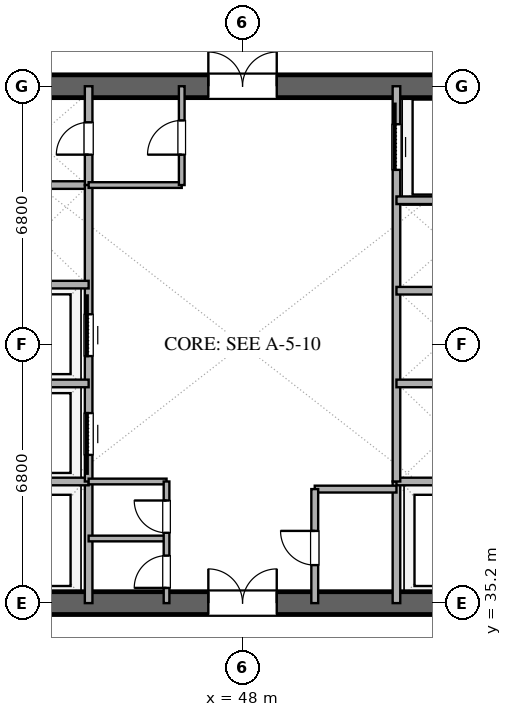
"""IFC4 building model, lengths in metres.
Left out: names, types, materials, properties, quantities, classifications, styles, units other than length and angle.
Written with IfcOpenShell. Run it as: python <this file> out.ifc"""

import sys

from ifc_helpers import new_model, si_unit, direction, frame, frame_2d, origin, place, context, subcontext, project, spatial, rectangle, extrude, element, fill, save


model = new_model("IFC4")
c1 = context("Model", 3, precision=1e-05, world=origin(), true_north=direction((0.0, 1.0)))
c2 = subcontext(c1, "Body", "Model", "MODEL_VIEW")
j1 = project(units=[si_unit("LENGTHUNIT", "METRE"), si_unit("PLANEANGLEUNIT", "RADIAN")], contexts=[c1])
p1 = place(None, origin())
s1 = spatial("IfcSite", under=j1, at=p1, CompositionType="ELEMENT")
p2 = place(p1, origin())
s2 = spatial("IfcBuilding", under=s1, at=p2, CompositionType="ELEMENT")
p3 = place(p2, frame((0.0, 0.0, 42.6)))
s3 = spatial("IfcBuildingStorey", under=s2, at=p3, CompositionType="ELEMENT", Elevation=42.6)
p4 = place(p3, frame((41.0, 35.2, 0.0), z_axis=(0.0, 0.0, 1.0), x_axis=(1.0, 0.0, 0.0)))
e1 = element("IfcWall", 1, at=p4, inside=s3, PredefinedType="SHEAR", context=c2, shape_type="SweptSolid", body=[
    extrude(rectangle(XDim=14.0, YDim=0.6, at=frame_2d((7.0, 0.0))), origin(), (0.0, 0.0, 1.0), 3.38),
])
p5 = place(p4, frame((6.1, 0.0, 0.0)))
e2 = element("IfcOpeningElement", 2, at=p5, cuts=e1, PredefinedType="OPENING", context=c2, shape_type="SweptSolid", body=[
    extrude(rectangle(XDim=1.8, YDim=2.25, at=frame_2d((0.9, 1.125))), frame((0.0, 0.31, 0.0), z_axis=(0.0, -1.0, 0.0), x_axis=(1.0, 0.0, 0.0)), (0.0, 0.0, 1.0), 0.62),
])
p6 = place(p3, frame((41.0, 48.8, 0.0), z_axis=(0.0, 0.0, 1.0), x_axis=(1.0, 0.0, 0.0)))
e3 = element("IfcWall", 3, at=p6, inside=s3, PredefinedType="SHEAR", context=c2, shape_type="SweptSolid", body=[
    extrude(rectangle(XDim=14.0, YDim=0.6, at=frame_2d((7.0, 0.0))), origin(), (0.0, 0.0, 1.0), 3.38),
])
p7 = place(p6, frame((6.1, 0.0, 0.0)))
e4 = element("IfcOpeningElement", 4, at=p7, cuts=e3, PredefinedType="OPENING", context=c2, shape_type="SweptSolid", body=[
    extrude(rectangle(XDim=1.8, YDim=2.25, at=frame_2d((0.9, 1.125))), frame((0.0, 0.31, 0.0), z_axis=(0.0, -1.0, 0.0), x_axis=(1.0, 0.0, 0.0)), (0.0, 0.0, 1.0), 0.62),
])
p8 = place(p3, frame((43.95, 35.2, 0.0), z_axis=(0.0, 0.0, 1.0), x_axis=(0.0, 1.0, 0.0)))
e5 = element("IfcWall", 5, at=p8, inside=s3, PredefinedType="SOLIDWALL", context=c2, shape_type="SweptSolid", body=[
    extrude(rectangle(XDim=3.2, YDim=0.2, at=frame_2d((1.6, 0.0))), origin(), (0.0, 0.0, 1.0), 2.74),
])
p9 = place(p3, frame((41.0, 38.4, 0.0), z_axis=(0.0, 0.0, 1.0), x_axis=(1.0, 0.0, 0.0)))
e6 = element("IfcWall", 6, at=p9, inside=s3, PredefinedType="SOLIDWALL", context=c2, shape_type="SweptSolid", body=[
    extrude(rectangle(XDim=2.95, YDim=0.2, at=frame_2d((1.475, 0.0))), origin(), (0.0, 0.0, 1.0), 2.74),
])
p10 = place(p3, frame((52.05, 35.2, 0.0), z_axis=(0.0, 0.0, 1.0), x_axis=(0.0, 1.0, 0.0)))
e7 = element("IfcWall", 7, at=p10, inside=s3, PredefinedType="SOLIDWALL", context=c2, shape_type="SweptSolid", body=[
    extrude(rectangle(XDim=3.2, YDim=0.2, at=frame_2d((1.6, 0.0))), origin(), (0.0, 0.0, 1.0), 2.74),
])
for number, where, z_axis, x_axis in (
    (8, (52.05, 38.4, 0.0), (0.0, 0.0, 1.0), (1.0, 0.0, 0.0)),
    (9, (41.0, 46.2, 0.0), (0.0, 0.0, 1.0), (1.0, 0.0, 0.0)),
):
    element("IfcWall", number, at=place(p3, frame(where, z_axis=z_axis, x_axis=x_axis)), inside=s3, PredefinedType="SOLIDWALL", context=c2, shape_type="SweptSolid", body=[
        extrude(rectangle(XDim=2.95, YDim=0.2, at=frame_2d((1.475, 0.0))), origin(), (0.0, 0.0, 1.0), 2.74),
    ])
p11 = place(p3, frame((43.95, 46.2, 0.0), z_axis=(0.0, 0.0, 1.0), x_axis=(0.0, 1.0, 0.0)))
e10 = element("IfcWall", 10, at=p11, inside=s3, PredefinedType="SOLIDWALL", context=c2, shape_type="SweptSolid", body=[
    extrude(rectangle(XDim=2.6, YDim=0.2, at=frame_2d((1.3, 0.0))), origin(), (0.0, 0.0, 1.0), 2.74),
])
p12 = place(p11, frame((0.8, 0.0, 0.0)))
e11 = element("IfcOpeningElement", 11, at=p12, cuts=e10, PredefinedType="OPENING", context=c2, shape_type="SweptSolid", body=[
    extrude(rectangle(XDim=0.85, YDim=2.15, at=frame_2d((0.425, 1.075))), frame((0.0, 0.11, 0.0), z_axis=(0.0, -1.0, 0.0), x_axis=(1.0, 0.0, 0.0)), (0.0, 0.0, 1.0), 0.22),
])
p13 = place(p3, frame((43.95, 38.4, 0.0), z_axis=(0.0, 0.0, 1.0), x_axis=(0.0, 1.0, 0.0)))
e12 = element("IfcWall", 12, at=p13, inside=s3, PredefinedType="SOLIDWALL", context=c2, shape_type="SweptSolid", body=[
    extrude(rectangle(XDim=7.8, YDim=0.2, at=frame_2d((3.9, 0.0))), origin(), (0.0, 0.0, 1.0), 2.74),
])
p14 = place(p13, frame((0.7, 0.0, 0.0)))
e13 = element("IfcOpeningElement", 13, at=p14, cuts=e12, PredefinedType="OPENING", context=c2, shape_type="SweptSolid", body=[
    extrude(rectangle(XDim=1.1, YDim=2.2, at=frame_2d((0.55, 1.1))), frame((0.0, 0.11, 0.0), z_axis=(0.0, -1.0, 0.0), x_axis=(1.0, 0.0, 0.0)), (0.0, 0.0, 1.0), 0.22),
])
p15 = place(p13, frame((3.3, 0.0, 0.0)))
e14 = element("IfcOpeningElement", 14, at=p15, cuts=e12, PredefinedType="OPENING", context=c2, shape_type="SweptSolid", body=[
    extrude(rectangle(XDim=1.1, YDim=2.2, at=frame_2d((0.55, 1.1))), frame((0.0, 0.11, 0.0), z_axis=(0.0, -1.0, 0.0), x_axis=(1.0, 0.0, 0.0)), (0.0, 0.0, 1.0), 0.22),
])
for number, where, z_axis, x_axis in (
    (15, (41.0, 40.98, 0.0), (0.0, 0.0, 1.0), (1.0, 0.0, 0.0)),
    (16, (41.0, 43.58, 0.0), (0.0, 0.0, 1.0), (1.0, 0.0, 0.0)),
):
    element("IfcWall", number, at=place(p3, frame(where, z_axis=z_axis, x_axis=x_axis)), inside=s3, PredefinedType="SOLIDWALL", context=c2, shape_type="SweptSolid", body=[
        extrude(rectangle(XDim=2.95, YDim=0.2, at=frame_2d((1.475, 0.0))), origin(), (0.0, 0.0, 1.0), 2.74),
    ])
p16 = place(p3, frame((52.05, 38.4, 0.0), z_axis=(0.0, 0.0, 1.0), x_axis=(0.0, 1.0, 0.0)))
e17 = element("IfcWall", 17, at=p16, inside=s3, PredefinedType="SOLIDWALL", context=c2, shape_type="SweptSolid", body=[
    extrude(rectangle(XDim=10.4, YDim=0.2, at=frame_2d((5.2, 0.0))), origin(), (0.0, 0.0, 1.0), 2.74),
])
p17 = place(p16, frame((8.2, 0.0, 0.0)))
e18 = element("IfcOpeningElement", 18, at=p17, cuts=e17, PredefinedType="OPENING", context=c2, shape_type="SweptSolid", body=[
    extrude(rectangle(XDim=1.2, YDim=2.2, at=frame_2d((0.6, 1.1))), frame((0.0, 0.11, 0.0), z_axis=(0.0, -1.0, 0.0), x_axis=(1.0, 0.0, 0.0)), (0.0, 0.0, 1.0), 0.22),
])
for number, where, z_axis, x_axis in (
    (19, (52.05, 40.98, 0.0), (0.0, 0.0, 1.0), (1.0, 0.0, 0.0)),
    (20, (52.05, 43.42, 0.0), (0.0, 0.0, 1.0), (1.0, 0.0, 0.0)),
    (21, (52.05, 45.8, 0.0), (0.0, 0.0, 1.0), (1.0, 0.0, 0.0)),
):
    element("IfcWall", number, at=place(p3, frame(where, z_axis=z_axis, x_axis=x_axis)), inside=s3, PredefinedType="SOLIDWALL", context=c2, shape_type="SweptSolid", body=[
        extrude(rectangle(XDim=2.95, YDim=0.2, at=frame_2d((1.475, 0.0))), origin(), (0.0, 0.0, 1.0), 2.74),
    ])
for number, where, z_axis, x_axis in (
    (22, (43.95, 36.9, 0.0), (0.0, 0.0, 1.0), (1.0, 0.0, 0.0)),
    (23, (43.95, 38.4, 0.0), (0.0, 0.0, 1.0), (1.0, 0.0, 0.0)),
):
    element("IfcWall", number, at=place(p3, frame(where, z_axis=z_axis, x_axis=x_axis)), inside=s3, PredefinedType="PARTITIONING", context=c2, shape_type="SweptSolid", body=[
        extrude(rectangle(XDim=2.05, YDim=0.15, at=frame_2d((1.025, 0.0))), origin(), (0.0, 0.0, 1.0), 2.74),
    ])
p18 = place(p3, frame((46.0, 35.2, 0.0), z_axis=(0.0, 0.0, 1.0), x_axis=(0.0, 1.0, 0.0)))
e24 = element("IfcWall", 24, at=p18, inside=s3, PredefinedType="PARTITIONING", context=c2, shape_type="SweptSolid", body=[
    extrude(rectangle(XDim=3.2, YDim=0.15, at=frame_2d((1.6, 0.0))), origin(), (0.0, 0.0, 1.0), 2.74),
])
p19 = place(p18, frame((0.4, 0.0, 0.0)))
e25 = element("IfcOpeningElement", 25, at=p19, cuts=e24, PredefinedType="OPENING", context=c2, shape_type="SweptSolid", body=[
    extrude(rectangle(XDim=0.85, YDim=2.15, at=frame_2d((0.425, 1.075))), frame((0.0, 0.085, 0.0), z_axis=(0.0, -1.0, 0.0), x_axis=(1.0, 0.0, 0.0)), (0.0, 0.0, 1.0), 0.17),
])
p20 = place(p18, frame((1.85, 0.0, 0.0)))
e26 = element("IfcOpeningElement", 26, at=p20, cuts=e24, PredefinedType="OPENING", context=c2, shape_type="SweptSolid", body=[
    extrude(rectangle(XDim=0.85, YDim=2.15, at=frame_2d((0.425, 1.075))), frame((0.0, 0.085, 0.0), z_axis=(0.0, -1.0, 0.0), x_axis=(1.0, 0.0, 0.0)), (0.0, 0.0, 1.0), 0.17),
])
p21 = place(p3, frame((43.95, 46.2, 0.0), z_axis=(0.0, 0.0, 1.0), x_axis=(1.0, 0.0, 0.0)))
e27 = element("IfcWall", 27, at=p21, inside=s3, PredefinedType="PARTITIONING", context=c2, shape_type="SweptSolid", body=[
    extrude(rectangle(XDim=2.45, YDim=0.15, at=frame_2d((1.225, 0.0))), origin(), (0.0, 0.0, 1.0), 2.74),
])
p22 = place(p3, frame((46.4, 46.2, 0.0), z_axis=(0.0, 0.0, 1.0), x_axis=(0.0, 1.0, 0.0)))
e28 = element("IfcWall", 28, at=p22, inside=s3, PredefinedType="PARTITIONING", context=c2, shape_type="SweptSolid", body=[
    extrude(rectangle(XDim=2.6, YDim=0.15, at=frame_2d((1.3, 0.0))), origin(), (0.0, 0.0, 1.0), 2.74),
])
p23 = place(p22, frame((0.8, 0.0, 0.0)))
e29 = element("IfcOpeningElement", 29, at=p23, cuts=e28, PredefinedType="OPENING", context=c2, shape_type="SweptSolid", body=[
    extrude(rectangle(XDim=0.9, YDim=2.15, at=frame_2d((0.45, 1.075))), frame((0.0, 0.085, 0.0), z_axis=(0.0, -1.0, 0.0), x_axis=(1.0, 0.0, 0.0)), (0.0, 0.0, 1.0), 0.17),
])
p24 = place(p3, frame((49.9, 38.2, 0.0), z_axis=(0.0, 0.0, 1.0), x_axis=(1.0, 0.0, 0.0)))
e30 = element("IfcWall", 30, at=p24, inside=s3, PredefinedType="PLUMBINGWALL", context=c2, shape_type="SweptSolid", body=[
    extrude(rectangle(XDim=2.15, YDim=0.18, at=frame_2d((1.075, 0.0))), origin(), (0.0, 0.0, 1.0), 2.74),
])
p25 = place(p3, frame((49.9, 35.2, 0.0), z_axis=(0.0, 0.0, 1.0), x_axis=(0.0, 1.0, 0.0)))
e31 = element("IfcWall", 31, at=p25, inside=s3, PredefinedType="PLUMBINGWALL", context=c2, shape_type="SweptSolid", body=[
    extrude(rectangle(XDim=3.0, YDim=0.18, at=frame_2d((1.5, 0.0))), origin(), (0.0, 0.0, 1.0), 2.74),
])
p26 = place(p25, frame((1.0, 0.0, 0.0)))
e32 = element("IfcOpeningElement", 32, at=p26, cuts=e31, PredefinedType="OPENING", context=c2, shape_type="SweptSolid", body=[
    extrude(rectangle(XDim=0.9, YDim=2.1, at=frame_2d((0.45, 1.05))), frame((0.0, 0.1, 0.0), z_axis=(0.0, -1.0, 0.0), x_axis=(1.0, 0.0, 0.0)), (0.0, 0.0, 1.0), 0.2),
])
p27 = place(p5, origin())
e33 = element("IfcDoor", 33, at=p27, inside=s3, OperationType="DOUBLE_DOOR_SINGLE_SWING", PredefinedType="DOOR", context=c2, shape_type="SweptSolid", body=[
    extrude(rectangle(XDim=1.8, YDim=2.25, at=frame_2d((0.9, 1.125))), frame((0.0, 0.025, 0.0), z_axis=(0.0, -1.0, 0.0), x_axis=(1.0, 0.0, 0.0)), (0.0, 0.0, 1.0), 0.05),
])
fill(e2, e33)
p28 = place(p7, origin())
e34 = element("IfcDoor", 34, at=p28, inside=s3, OperationType="DOUBLE_DOOR_SINGLE_SWING", PredefinedType="DOOR", context=c2, shape_type="SweptSolid", body=[
    extrude(rectangle(XDim=1.8, YDim=2.25, at=frame_2d((0.9, 1.125))), frame((0.0, 0.025, 0.0), z_axis=(0.0, -1.0, 0.0), x_axis=(1.0, 0.0, 0.0)), (0.0, 0.0, 1.0), 0.05),
])
fill(e4, e34)
p29 = place(p12, origin())
e35 = element("IfcDoor", 35, at=p29, inside=s3, OperationType="SINGLE_SWING_LEFT", PredefinedType="DOOR", context=c2, shape_type="SweptSolid", body=[
    extrude(rectangle(XDim=0.85, YDim=2.15, at=frame_2d((0.425, 1.075))), frame((0.0, 0.025, 0.0), z_axis=(0.0, -1.0, 0.0), x_axis=(1.0, 0.0, 0.0)), (0.0, 0.0, 1.0), 0.05),
])
fill(e11, e35)
p30 = place(p14, origin())
e36 = element("IfcDoor", 36, at=p30, inside=s3, OperationType="SLIDING_TO_LEFT", PredefinedType="DOOR", context=c2, shape_type="SweptSolid", body=[
    extrude(rectangle(XDim=1.1, YDim=2.2, at=frame_2d((0.55, 1.1))), frame((0.0, 0.025, 0.0), z_axis=(0.0, -1.0, 0.0), x_axis=(1.0, 0.0, 0.0)), (0.0, 0.0, 1.0), 0.05),
])
fill(e13, e36)
p31 = place(p15, origin())
e37 = element("IfcDoor", 37, at=p31, inside=s3, OperationType="SLIDING_TO_RIGHT", PredefinedType="DOOR", context=c2, shape_type="SweptSolid", body=[
    extrude(rectangle(XDim=1.1, YDim=2.2, at=frame_2d((0.55, 1.1))), frame((0.0, 0.025, 0.0), z_axis=(0.0, -1.0, 0.0), x_axis=(1.0, 0.0, 0.0)), (0.0, 0.0, 1.0), 0.05),
])
fill(e14, e37)
p32 = place(p17, origin())
e38 = element("IfcDoor", 38, at=p32, inside=s3, OperationType="SLIDING_TO_RIGHT", PredefinedType="DOOR", context=c2, shape_type="SweptSolid", body=[
    extrude(rectangle(XDim=1.2, YDim=2.2, at=frame_2d((0.6, 1.1))), frame((0.0, 0.025, 0.0), z_axis=(0.0, -1.0, 0.0), x_axis=(1.0, 0.0, 0.0)), (0.0, 0.0, 1.0), 0.05),
])
fill(e18, e38)
p33 = place(p19, origin())
e39 = element("IfcDoor", 39, at=p33, inside=s3, OperationType="SINGLE_SWING_LEFT", PredefinedType="DOOR", context=c2, shape_type="SweptSolid", body=[
    extrude(rectangle(XDim=0.85, YDim=2.15, at=frame_2d((0.425, 1.075))), frame((0.0, 0.025, 0.0), z_axis=(0.0, -1.0, 0.0), x_axis=(1.0, 0.0, 0.0)), (0.0, 0.0, 1.0), 0.05),
])
fill(e25, e39)
p34 = place(p20, origin())
e40 = element("IfcDoor", 40, at=p34, inside=s3, OperationType="SINGLE_SWING_RIGHT", PredefinedType="DOOR", context=c2, shape_type="SweptSolid", body=[
    extrude(rectangle(XDim=0.85, YDim=2.15, at=frame_2d((0.425, 1.075))), frame((0.0, 0.025, 0.0), z_axis=(0.0, -1.0, 0.0), x_axis=(1.0, 0.0, 0.0)), (0.0, 0.0, 1.0), 0.05),
])
fill(e26, e40)
p35 = place(p23, origin())
e41 = element("IfcDoor", 41, at=p35, inside=s3, OperationType="SINGLE_SWING_LEFT", PredefinedType="DOOR", context=c2, shape_type="SweptSolid", body=[
    extrude(rectangle(XDim=0.9, YDim=2.15, at=frame_2d((0.45, 1.075))), frame((0.0, 0.025, 0.0), z_axis=(0.0, -1.0, 0.0), x_axis=(1.0, 0.0, 0.0)), (0.0, 0.0, 1.0), 0.05),
])
fill(e29, e41)
p36 = place(p26, origin())
e42 = element("IfcDoor", 42, at=p36, inside=s3, OperationType="SINGLE_SWING_RIGHT", PredefinedType="DOOR", context=c2, shape_type="SweptSolid", body=[
    extrude(rectangle(XDim=0.9, YDim=2.1, at=frame_2d((0.45, 1.05))), frame((0.0, 0.025, 0.0), z_axis=(0.0, -1.0, 0.0), x_axis=(1.0, 0.0, 0.0)), (0.0, 0.0, 1.0), 0.05),
])
fill(e32, e42)
save(model, sys.argv[1])
